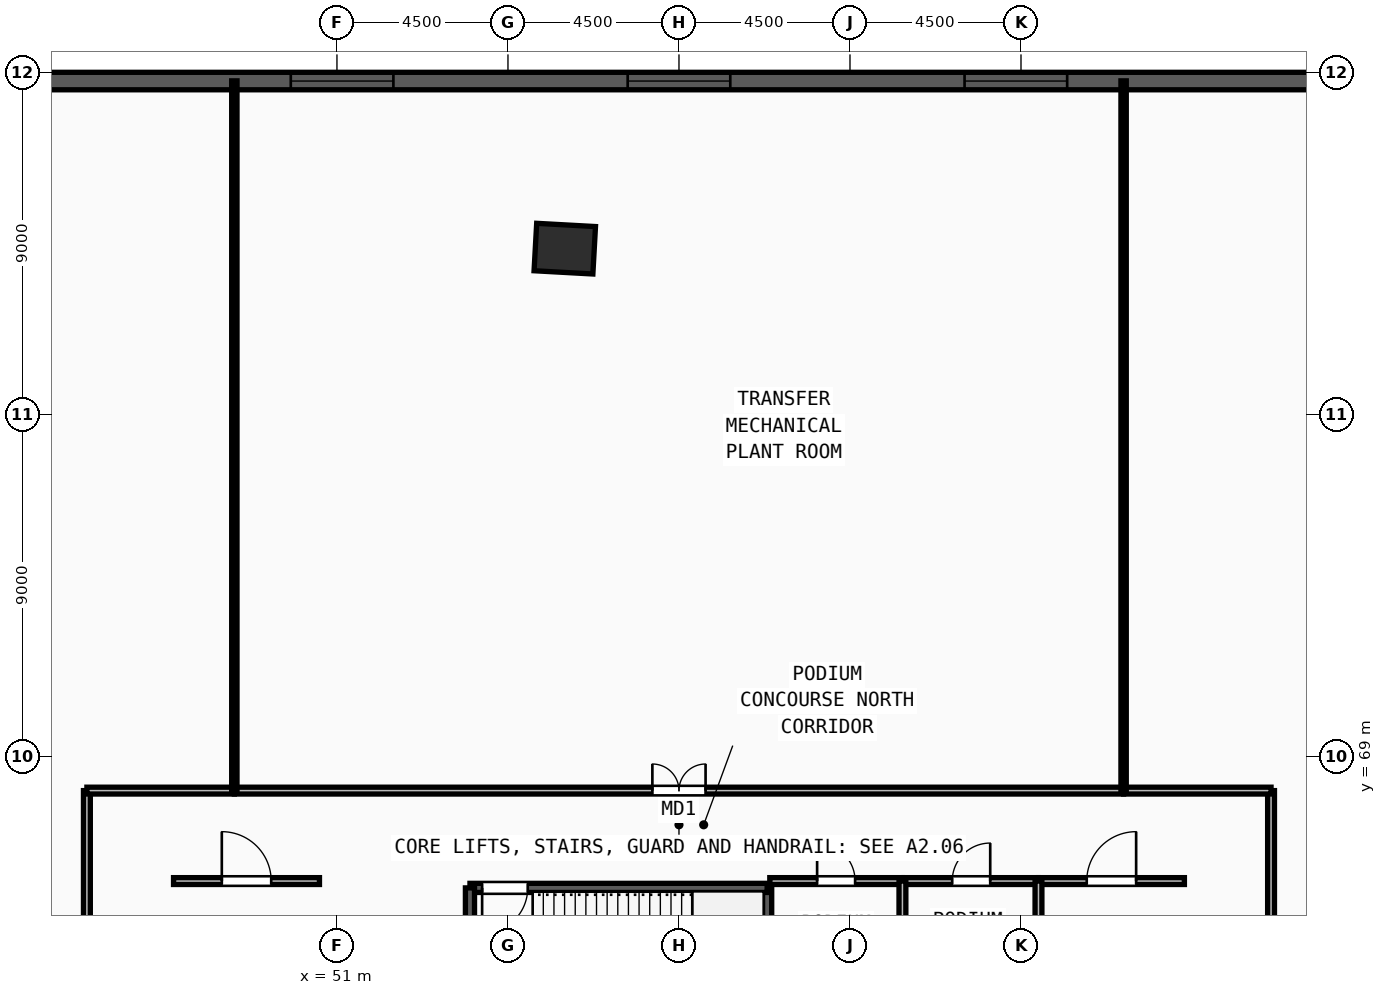
"""IFC4 building model, lengths in metres.
Left out: names, types, materials, properties, quantities, classifications, styles, units other than length and angle.
Written with IfcOpenShell. Run it as: python <this file> out.ifc"""

import sys

from ifc_helpers import new_model, si_unit, direction, frame, frame_2d, origin, origin_2d, place, context, subcontext, project, spatial, rectangle, extrude, source, transform, mapped, element, fill, save


model = new_model("IFC4")
c1 = context("Model", 3, precision=1e-05, world=origin(), true_north=direction((0.0, 1.0)))
c2 = subcontext(c1, "Body", "Model", "MODEL_VIEW")
j1 = project(units=[si_unit("LENGTHUNIT", "METRE"), si_unit("PLANEANGLEUNIT", "RADIAN")], contexts=[c1])
p1 = place(None, origin())
s1 = spatial("IfcSite", under=j1, at=p1, CompositionType="ELEMENT")
p2 = place(p1, origin())
s2 = spatial("IfcBuilding", under=s1, at=p2, CompositionType="ELEMENT")
p3 = place(p2, frame((0.0, 0.0, 23.4)))
s3 = spatial("IfcBuildingStorey", under=s2, at=p3, CompositionType="ELEMENT", Elevation=23.4)
m1 = source(origin(), c2, "Body", "SweptSolid", [
    extrude(rectangle(XDim=1.55, YDim=1.25, at=origin_2d()), origin(), (0.0, 0.0, 1.0), 5.1),
])
p4 = place(p3, frame((56.995, 82.36, 0.0), z_axis=(0.0, 0.0, 1.0), x_axis=(-0.998479491627, 0.055124448298, 0.0)))
e1 = element("IfcColumn", 1, at=p4, inside=s3, PredefinedType="COLUMN", context=c2, shape_type="MappedRepresentation", body=[
    mapped(m1, transform((0.0, 0.0, 0.0), x_axis=(1.0, 0.0, 0.0), y_axis=(0.0, 1.0, 0.0), z_axis=(0.0, 0.0, 1.0), scale=1.0)),
])
p5 = place(p3, frame((95.46, 86.77, 0.0), z_axis=(0.0, 0.0, 1.0), x_axis=(-1.0, 0.0, 0.0)))
e2 = element("IfcWall", 2, at=p5, inside=s3, PredefinedType="SOLIDWALL", context=c2, shape_type="SweptSolid", body=[
    extrude(rectangle(XDim=70.92, YDim=0.46, at=frame_2d((35.46, 0.0))), origin(), (0.0, 0.0, 1.0), 4.82),
])
m2 = source(origin(), c2, "Body", "SweptSolid", [
    extrude(rectangle(XDim=2.7, YDim=2.35, at=frame_2d((1.35, 1.175))), frame((0.0, 0.24, 0.0), z_axis=(0.0, -1.0, 0.0), x_axis=(1.0, 0.0, 0.0)), (0.0, 0.0, 1.0), 0.48),
])
p6 = place(p5, frame((7.515, 0.0, 0.55)))
e3 = element("IfcOpeningElement", 3, at=p6, cuts=e2, PredefinedType="OPENING", context=c2, shape_type="MappedRepresentation", body=[
    mapped(m2, transform((0.0, 0.0, 0.0), x_axis=(1.0, 0.0, 0.0), y_axis=(0.0, 1.0, 0.0), z_axis=(0.0, 0.0, 1.0), scale=1.0)),
])
p7 = place(p5, frame((25.245, 0.0, 0.55)))
e4 = element("IfcOpeningElement", 4, at=p7, cuts=e2, PredefinedType="OPENING", context=c2, shape_type="MappedRepresentation", body=[
    mapped(m2, transform((0.0, 0.0, 0.0), x_axis=(1.0, 0.0, 0.0), y_axis=(0.0, 1.0, 0.0), z_axis=(0.0, 0.0, 1.0), scale=1.0)),
])
p8 = place(p5, frame((34.11, 0.0, 0.55)))
e5 = element("IfcOpeningElement", 5, at=p8, cuts=e2, PredefinedType="OPENING", context=c2, shape_type="MappedRepresentation", body=[
    mapped(m2, transform((0.0, 0.0, 0.0), x_axis=(1.0, 0.0, 0.0), y_axis=(0.0, 1.0, 0.0), z_axis=(0.0, 0.0, 1.0), scale=1.0)),
])
p9 = place(p5, frame((42.975, 0.0, 0.55)))
e6 = element("IfcOpeningElement", 6, at=p9, cuts=e2, PredefinedType="OPENING", context=c2, shape_type="MappedRepresentation", body=[
    mapped(m2, transform((0.0, 0.0, 0.0), x_axis=(1.0, 0.0, 0.0), y_axis=(0.0, 1.0, 0.0), z_axis=(0.0, 0.0, 1.0), scale=1.0)),
])
p10 = place(p5, frame((60.705, 0.0, 0.55)))
e7 = element("IfcOpeningElement", 7, at=p10, cuts=e2, PredefinedType="OPENING", context=c2, shape_type="MappedRepresentation", body=[
    mapped(m2, transform((0.0, 0.0, 0.0), x_axis=(1.0, 0.0, 0.0), y_axis=(0.0, 1.0, 0.0), z_axis=(0.0, 0.0, 1.0), scale=1.0)),
])
p11 = place(p3, frame((62.32, 62.1, 0.0), z_axis=(0.0, 0.0, 1.0), x_axis=(0.0, 1.0, 0.0)))
e8 = element("IfcWall", 8, at=p11, inside=s3, PredefinedType="SOLIDWALL", context=c2, shape_type="SweptSolid", body=[
    extrude(rectangle(XDim=3.44, YDim=0.24, at=frame_2d((1.72, 0.0))), origin(), (0.0, 0.0, 1.0), 4.82),
])
p12 = place(p3, frame((62.32, 65.54, 0.0), z_axis=(0.0, 0.0, 1.0), x_axis=(-1.0, 0.0, 0.0)))
e9 = element("IfcWall", 9, at=p12, inside=s3, PredefinedType="SOLIDWALL", context=c2, shape_type="SweptSolid", body=[
    extrude(rectangle(XDim=7.82, YDim=0.24, at=frame_2d((3.91, 0.0))), origin(), (0.0, 0.0, 1.0), 4.82),
])
m3 = source(origin(), c2, "Body", "SweptSolid", [
    extrude(rectangle(XDim=1.2, YDim=2.2, at=frame_2d((0.6, 1.1))), frame((0.0, 0.13, 0.0), z_axis=(0.0, -1.0, 0.0), x_axis=(1.0, 0.0, 0.0)), (0.0, 0.0, 1.0), 0.26),
])
p13 = place(p12, frame((6.3, 0.0, 0.0)))
e10 = element("IfcOpeningElement", 10, at=p13, cuts=e9, PredefinedType="OPENING", context=c2, shape_type="MappedRepresentation", body=[
    mapped(m3, transform((0.0, 0.0, 0.0), x_axis=(1.0, 0.0, 0.0), y_axis=(0.0, 1.0, 0.0), z_axis=(0.0, 0.0, 1.0), scale=1.0)),
])
p14 = place(p3, frame((54.5, 65.54, 0.0), z_axis=(0.0, 0.0, 1.0), x_axis=(0.0, -1.0, 0.0)))
e11 = element("IfcWall", 11, at=p14, inside=s3, PredefinedType="SOLIDWALL", context=c2, shape_type="SweptSolid", body=[
    extrude(rectangle(XDim=3.44, YDim=0.24, at=frame_2d((1.72, 0.0))), origin(), (0.0, 0.0, 1.0), 4.82),
])
p15 = place(p3, frame((62.39, 65.72, 0.0), z_axis=(0.0, 0.0, 1.0), x_axis=(1.0, 0.0, 0.0)))
e12 = element("IfcWall", 12, at=p15, inside=s3, PredefinedType="PARTITIONING", context=c2, shape_type="SweptSolid", body=[
    extrude(rectangle(XDim=3.49, YDim=0.18, at=frame_2d((1.745, 0.0))), origin(), (0.0, 0.0, 1.0), 4.82),
])
m4 = source(origin(), c2, "Body", "SweptSolid", [
    extrude(rectangle(XDim=1.0, YDim=2.2, at=frame_2d((0.5, 1.1))), frame((0.0, 0.1, 0.0), z_axis=(0.0, -1.0, 0.0), x_axis=(1.0, 0.0, 0.0)), (0.0, 0.0, 1.0), 0.2),
])
p16 = place(p15, frame((1.245, 0.0, 0.0)))
e13 = element("IfcOpeningElement", 13, at=p16, cuts=e12, PredefinedType="OPENING", context=c2, shape_type="MappedRepresentation", body=[
    mapped(m4, transform((0.0, 0.0, 0.0), x_axis=(1.0, 0.0, 0.0), y_axis=(0.0, 1.0, 0.0), z_axis=(0.0, 0.0, 1.0), scale=1.0)),
])
p17 = place(p3, frame((65.92, 65.72, 0.0), z_axis=(0.0, 0.0, 1.0), x_axis=(1.0, 0.0, 0.0)))
e14 = element("IfcWall", 14, at=p17, inside=s3, PredefinedType="PARTITIONING", context=c2, shape_type="SweptSolid", body=[
    extrude(rectangle(XDim=3.54, YDim=0.18, at=frame_2d((1.77, 0.0))), origin(), (0.0, 0.0, 1.0), 4.82),
])
p18 = place(p17, frame((1.27, 0.0, 0.0)))
e15 = element("IfcOpeningElement", 15, at=p18, cuts=e14, PredefinedType="OPENING", context=c2, shape_type="MappedRepresentation", body=[
    mapped(m4, transform((0.0, 0.0, 0.0), x_axis=(1.0, 0.0, 0.0), y_axis=(0.0, 1.0, 0.0), z_axis=(0.0, 0.0, 1.0), scale=1.0)),
])
p19 = place(p3, frame((46.7, 65.72, 0.0), z_axis=(0.0, 0.0, 1.0), x_axis=(1.0, 0.0, 0.0)))
e16 = element("IfcWall", 16, at=p19, inside=s3, PredefinedType="PARTITIONING", context=c2, shape_type="SweptSolid", body=[
    extrude(rectangle(XDim=3.84, YDim=0.18, at=frame_2d((1.92, 0.0))), origin(), (0.0, 0.0, 1.0), 4.82),
])
m5 = source(origin(), c2, "Body", "SweptSolid", [
    extrude(rectangle(XDim=1.3, YDim=2.2, at=frame_2d((0.65, 1.1))), frame((0.0, 0.1, 0.0), z_axis=(0.0, -1.0, 0.0), x_axis=(1.0, 0.0, 0.0)), (0.0, 0.0, 1.0), 0.2),
])
p20 = place(p19, frame((1.27, 0.0, 0.0)))
e17 = element("IfcOpeningElement", 17, at=p20, cuts=e16, PredefinedType="OPENING", context=c2, shape_type="MappedRepresentation", body=[
    mapped(m5, transform((0.0, 0.0, 0.0), x_axis=(1.0, 0.0, 0.0), y_axis=(0.0, 1.0, 0.0), z_axis=(0.0, 0.0, 1.0), scale=1.0)),
])
p21 = place(p3, frame((69.46, 65.72, 0.0), z_axis=(0.0, 0.0, 1.0), x_axis=(1.0, 0.0, 0.0)))
e18 = element("IfcWall", 18, at=p21, inside=s3, PredefinedType="PARTITIONING", context=c2, shape_type="SweptSolid", body=[
    extrude(rectangle(XDim=3.84, YDim=0.18, at=frame_2d((1.92, 0.0))), origin(), (0.0, 0.0, 1.0), 4.82),
])
p22 = place(p21, frame((1.27, 0.0, 0.0)))
e19 = element("IfcOpeningElement", 19, at=p22, cuts=e18, PredefinedType="OPENING", context=c2, shape_type="MappedRepresentation", body=[
    mapped(m5, transform((0.0, 0.0, 0.0), x_axis=(1.0, 0.0, 0.0), y_axis=(0.0, 1.0, 0.0), z_axis=(0.0, 0.0, 1.0), scale=1.0)),
])
p23 = place(p3, frame((44.42, 46.1, 0.0), z_axis=(0.0, 0.0, 1.0), x_axis=(0.0, 1.0, 0.0)))
e20 = element("IfcWall", 20, at=p23, inside=s3, PredefinedType="PARTITIONING", context=c2, shape_type="SweptSolid", body=[
    extrude(rectangle(XDim=22.0, YDim=0.18, at=frame_2d((11.0, 0.0))), origin(), (0.0, 0.0, 1.0), 4.82),
])
m6 = source(origin(), c2, "Body", "SweptSolid", [
    extrude(rectangle(XDim=1.5, YDim=2.2, at=frame_2d((0.75, 1.1))), frame((0.0, 0.1, 0.0), z_axis=(0.0, -1.0, 0.0), x_axis=(1.0, 0.0, 0.0)), (0.0, 0.0, 1.0), 0.2),
])
p24 = place(p23, frame((10.25, 0.0, 0.0)))
e21 = element("IfcOpeningElement", 21, at=p24, cuts=e20, PredefinedType="OPENING", context=c2, shape_type="MappedRepresentation", body=[
    mapped(m6, transform((0.0, 0.0, 0.0), x_axis=(1.0, 0.0, 0.0), y_axis=(0.0, 1.0, 0.0), z_axis=(0.0, 0.0, 1.0), scale=1.0)),
])
p25 = place(p3, frame((75.58, 58.28, 0.0), z_axis=(0.0, 0.0, 1.0), x_axis=(0.0, 1.0, 0.0)))
e22 = element("IfcWall", 22, at=p25, inside=s3, PredefinedType="PARTITIONING", context=c2, shape_type="SweptSolid", body=[
    extrude(rectangle(XDim=9.82, YDim=0.18, at=frame_2d((4.91, 0.0))), origin(), (0.0, 0.0, 1.0), 4.82),
])
p26 = place(p25, frame((4.16, 0.0, 0.0)))
e23 = element("IfcOpeningElement", 23, at=p26, cuts=e22, PredefinedType="OPENING", context=c2, shape_type="MappedRepresentation", body=[
    mapped(m6, transform((0.0, 0.0, 0.0), x_axis=(1.0, 0.0, 0.0), y_axis=(0.0, 1.0, 0.0), z_axis=(0.0, 0.0, 1.0), scale=1.0)),
])
p27 = place(p3, frame((48.3, 68.1, 0.0), z_axis=(0.0, 0.0, 1.0), x_axis=(1.0, 0.0, 0.0)))
e24 = element("IfcWall", 24, at=p27, inside=s3, PredefinedType="PARTITIONING", context=c2, shape_type="SweptSolid", body=[
    extrude(rectangle(XDim=23.4, YDim=0.18, at=frame_2d((11.7, 0.0))), origin(), (0.0, 0.0, 1.0), 4.82),
])
m7 = source(origin(), c2, "Body", "SweptSolid", [
    extrude(rectangle(XDim=1.4, YDim=2.25, at=frame_2d((0.7, 1.125))), frame((0.0, 0.1, 0.0), z_axis=(0.0, -1.0, 0.0), x_axis=(1.0, 0.0, 0.0)), (0.0, 0.0, 1.0), 0.2),
])
p28 = place(p27, frame((11.0, 0.0, 0.0)))
e25 = element("IfcOpeningElement", 25, at=p28, cuts=e24, PredefinedType="OPENING", context=c2, shape_type="MappedRepresentation", body=[
    mapped(m7, transform((0.0, 0.0, 0.0), x_axis=(1.0, 0.0, 0.0), y_axis=(0.0, 1.0, 0.0), z_axis=(0.0, 0.0, 1.0), scale=1.0)),
])
for number, where, z_axis, x_axis in (
    (26, (44.42, 68.1, 0.0), (0.0, 0.0, 1.0), (1.0, 0.0, 0.0)),
    (27, (71.7, 68.1, 0.0), (0.0, 0.0, 1.0), (1.0, 0.0, 0.0)),
):
    element("IfcWall", number, at=place(p3, frame(where, z_axis=z_axis, x_axis=x_axis)), inside=s3, PredefinedType="PARTITIONING", context=c2, shape_type="SweptSolid", body=[
        extrude(rectangle(XDim=3.88, YDim=0.18, at=frame_2d((1.94, 0.0))), origin(), (0.0, 0.0, 1.0), 4.82),
    ])
for number, where, z_axis, x_axis in (
    (28, (48.3, 68.1, 0.0), (0.0, 0.0, 1.0), (0.0, 1.0, 0.0)),
    (29, (71.7, 68.1, 0.0), (0.0, 0.0, 1.0), (0.0, 1.0, 0.0)),
):
    element("IfcWall", number, at=place(p3, frame(where, z_axis=z_axis, x_axis=x_axis)), inside=s3, PredefinedType="PARTITIONING", context=c2, shape_type="SweptSolid", body=[
        extrude(rectangle(XDim=18.675, YDim=0.14, at=frame_2d((9.337, 0.0))), origin(), (0.0, 0.0, 1.0), 4.82),
    ])
p29 = place(p3, frame((65.88, 61.95, 0.0), z_axis=(0.0, 0.0, 1.0), x_axis=(0.0, 1.0, 0.0)))
e30 = element("IfcWall", 30, at=p29, inside=s3, PredefinedType="PARTITIONING", context=c2, shape_type="SweptSolid", body=[
    extrude(rectangle(XDim=3.77, YDim=0.18, at=frame_2d((1.885, 0.0))), origin(), (0.0, 0.0, 1.0), 4.82),
])
p30 = place(p3, frame((69.46, 61.95, 0.0), z_axis=(0.0, 0.0, 1.0), x_axis=(0.0, 1.0, 0.0)))
e31 = element("IfcWall", 31, at=p30, inside=s3, PredefinedType="PARTITIONING", context=c2, shape_type="SweptSolid", body=[
    extrude(rectangle(XDim=3.77, YDim=0.18, at=frame_2d((1.885, 0.0))), origin(), (0.0, 0.0, 1.0), 3.335),
])
m8 = source(origin(), c2, "Body", "SweptSolid", [
    extrude(rectangle(XDim=2.7, YDim=2.35, at=frame_2d((1.35, 1.175))), frame((0.0, 0.03, 0.0), z_axis=(0.0, -1.0, 0.0), x_axis=(1.0, 0.0, 0.0)), (0.0, 0.0, 1.0), 0.06),
])
p31 = place(p7, origin())
e32 = element("IfcWindow", 32, at=p31, inside=s3, PartitioningType="TRIPLE_PANEL_VERTICAL", PredefinedType="WINDOW", context=c2, shape_type="MappedRepresentation", body=[
    mapped(m8, transform((0.0, 0.0, 0.0), x_axis=(1.0, 0.0, 0.0), y_axis=(0.0, 1.0, 0.0), z_axis=(0.0, 0.0, 1.0), scale=1.0)),
])
fill(e4, e32)
p32 = place(p8, origin())
e33 = element("IfcWindow", 33, at=p32, inside=s3, PartitioningType="TRIPLE_PANEL_VERTICAL", PredefinedType="WINDOW", context=c2, shape_type="MappedRepresentation", body=[
    mapped(m8, transform((0.0, 0.0, 0.0), x_axis=(1.0, 0.0, 0.0), y_axis=(0.0, 1.0, 0.0), z_axis=(0.0, 0.0, 1.0), scale=1.0)),
])
fill(e5, e33)
p33 = place(p9, origin())
e34 = element("IfcWindow", 34, at=p33, inside=s3, PartitioningType="TRIPLE_PANEL_VERTICAL", PredefinedType="WINDOW", context=c2, shape_type="MappedRepresentation", body=[
    mapped(m8, transform((0.0, 0.0, 0.0), x_axis=(1.0, 0.0, 0.0), y_axis=(0.0, 1.0, 0.0), z_axis=(0.0, 0.0, 1.0), scale=1.0)),
])
fill(e6, e34)
m9 = source(origin(), c2, "Body", "SweptSolid", [
    extrude(rectangle(XDim=1.2, YDim=2.2, at=frame_2d((0.6, 1.1))), frame((0.0, 0.025, 0.0), z_axis=(0.0, -1.0, 0.0), x_axis=(1.0, 0.0, 0.0)), (0.0, 0.0, 1.0), 0.05),
])
p34 = place(p13, origin())
e35 = element("IfcDoor", 35, at=p34, inside=s3, OperationType="SINGLE_SWING_RIGHT", PredefinedType="DOOR", context=c2, shape_type="MappedRepresentation", body=[
    mapped(m9, transform((0.0, 0.0, 0.0), x_axis=(1.0, 0.0, 0.0), y_axis=(0.0, 1.0, 0.0), z_axis=(0.0, 0.0, 1.0), scale=1.0)),
])
fill(e10, e35)
m10 = source(origin(), c2, "Body", "SweptSolid", [
    extrude(rectangle(XDim=1.0, YDim=2.2, at=frame_2d((0.5, 1.1))), frame((0.0, 0.025, 0.0), z_axis=(0.0, -1.0, 0.0), x_axis=(1.0, 0.0, 0.0)), (0.0, 0.0, 1.0), 0.05),
])
p35 = place(p16, origin())
e36 = element("IfcDoor", 36, at=p35, inside=s3, OperationType="SINGLE_SWING_LEFT", PredefinedType="DOOR", context=c2, shape_type="MappedRepresentation", body=[
    mapped(m10, transform((0.0, 0.0, 0.0), x_axis=(1.0, 0.0, 0.0), y_axis=(0.0, 1.0, 0.0), z_axis=(0.0, 0.0, 1.0), scale=1.0)),
])
fill(e13, e36)
p36 = place(p18, origin())
e37 = element("IfcDoor", 37, at=p36, inside=s3, OperationType="SINGLE_SWING_RIGHT", PredefinedType="DOOR", context=c2, shape_type="MappedRepresentation", body=[
    mapped(m10, transform((0.0, 0.0, 0.0), x_axis=(1.0, 0.0, 0.0), y_axis=(0.0, 1.0, 0.0), z_axis=(0.0, 0.0, 1.0), scale=1.0)),
])
fill(e15, e37)
m11 = source(origin(), c2, "Body", "SweptSolid", [
    extrude(rectangle(XDim=1.3, YDim=2.2, at=frame_2d((0.65, 1.1))), frame((0.0, 0.025, 0.0), z_axis=(0.0, -1.0, 0.0), x_axis=(1.0, 0.0, 0.0)), (0.0, 0.0, 1.0), 0.05),
])
p37 = place(p20, origin())
e38 = element("IfcDoor", 38, at=p37, inside=s3, OperationType="SINGLE_SWING_LEFT", PredefinedType="DOOR", context=c2, shape_type="MappedRepresentation", body=[
    mapped(m11, transform((0.0, 0.0, 0.0), x_axis=(1.0, 0.0, 0.0), y_axis=(0.0, 1.0, 0.0), z_axis=(0.0, 0.0, 1.0), scale=1.0)),
])
fill(e17, e38)
p38 = place(p22, origin())
e39 = element("IfcDoor", 39, at=p38, inside=s3, OperationType="SINGLE_SWING_RIGHT", PredefinedType="DOOR", context=c2, shape_type="MappedRepresentation", body=[
    mapped(m11, transform((0.0, 0.0, 0.0), x_axis=(1.0, 0.0, 0.0), y_axis=(0.0, 1.0, 0.0), z_axis=(0.0, 0.0, 1.0), scale=1.0)),
])
fill(e19, e39)
m12 = source(origin(), c2, "Body", "SweptSolid", [
    extrude(rectangle(XDim=1.4, YDim=2.25, at=frame_2d((0.7, 1.125))), frame((0.0, 0.025, 0.0), z_axis=(0.0, -1.0, 0.0), x_axis=(1.0, 0.0, 0.0)), (0.0, 0.0, 1.0), 0.05),
])
p39 = place(p28, origin())
e40 = element("IfcDoor", 40, at=p39, inside=s3, OperationType="DOUBLE_DOOR_SINGLE_SWING", PredefinedType="DOOR", context=c2, shape_type="MappedRepresentation", body=[
    mapped(m12, transform((0.0, 0.0, 0.0), x_axis=(1.0, 0.0, 0.0), y_axis=(0.0, 1.0, 0.0), z_axis=(0.0, 0.0, 1.0), scale=1.0)),
])
fill(e25, e40)
save(model, sys.argv[1])
